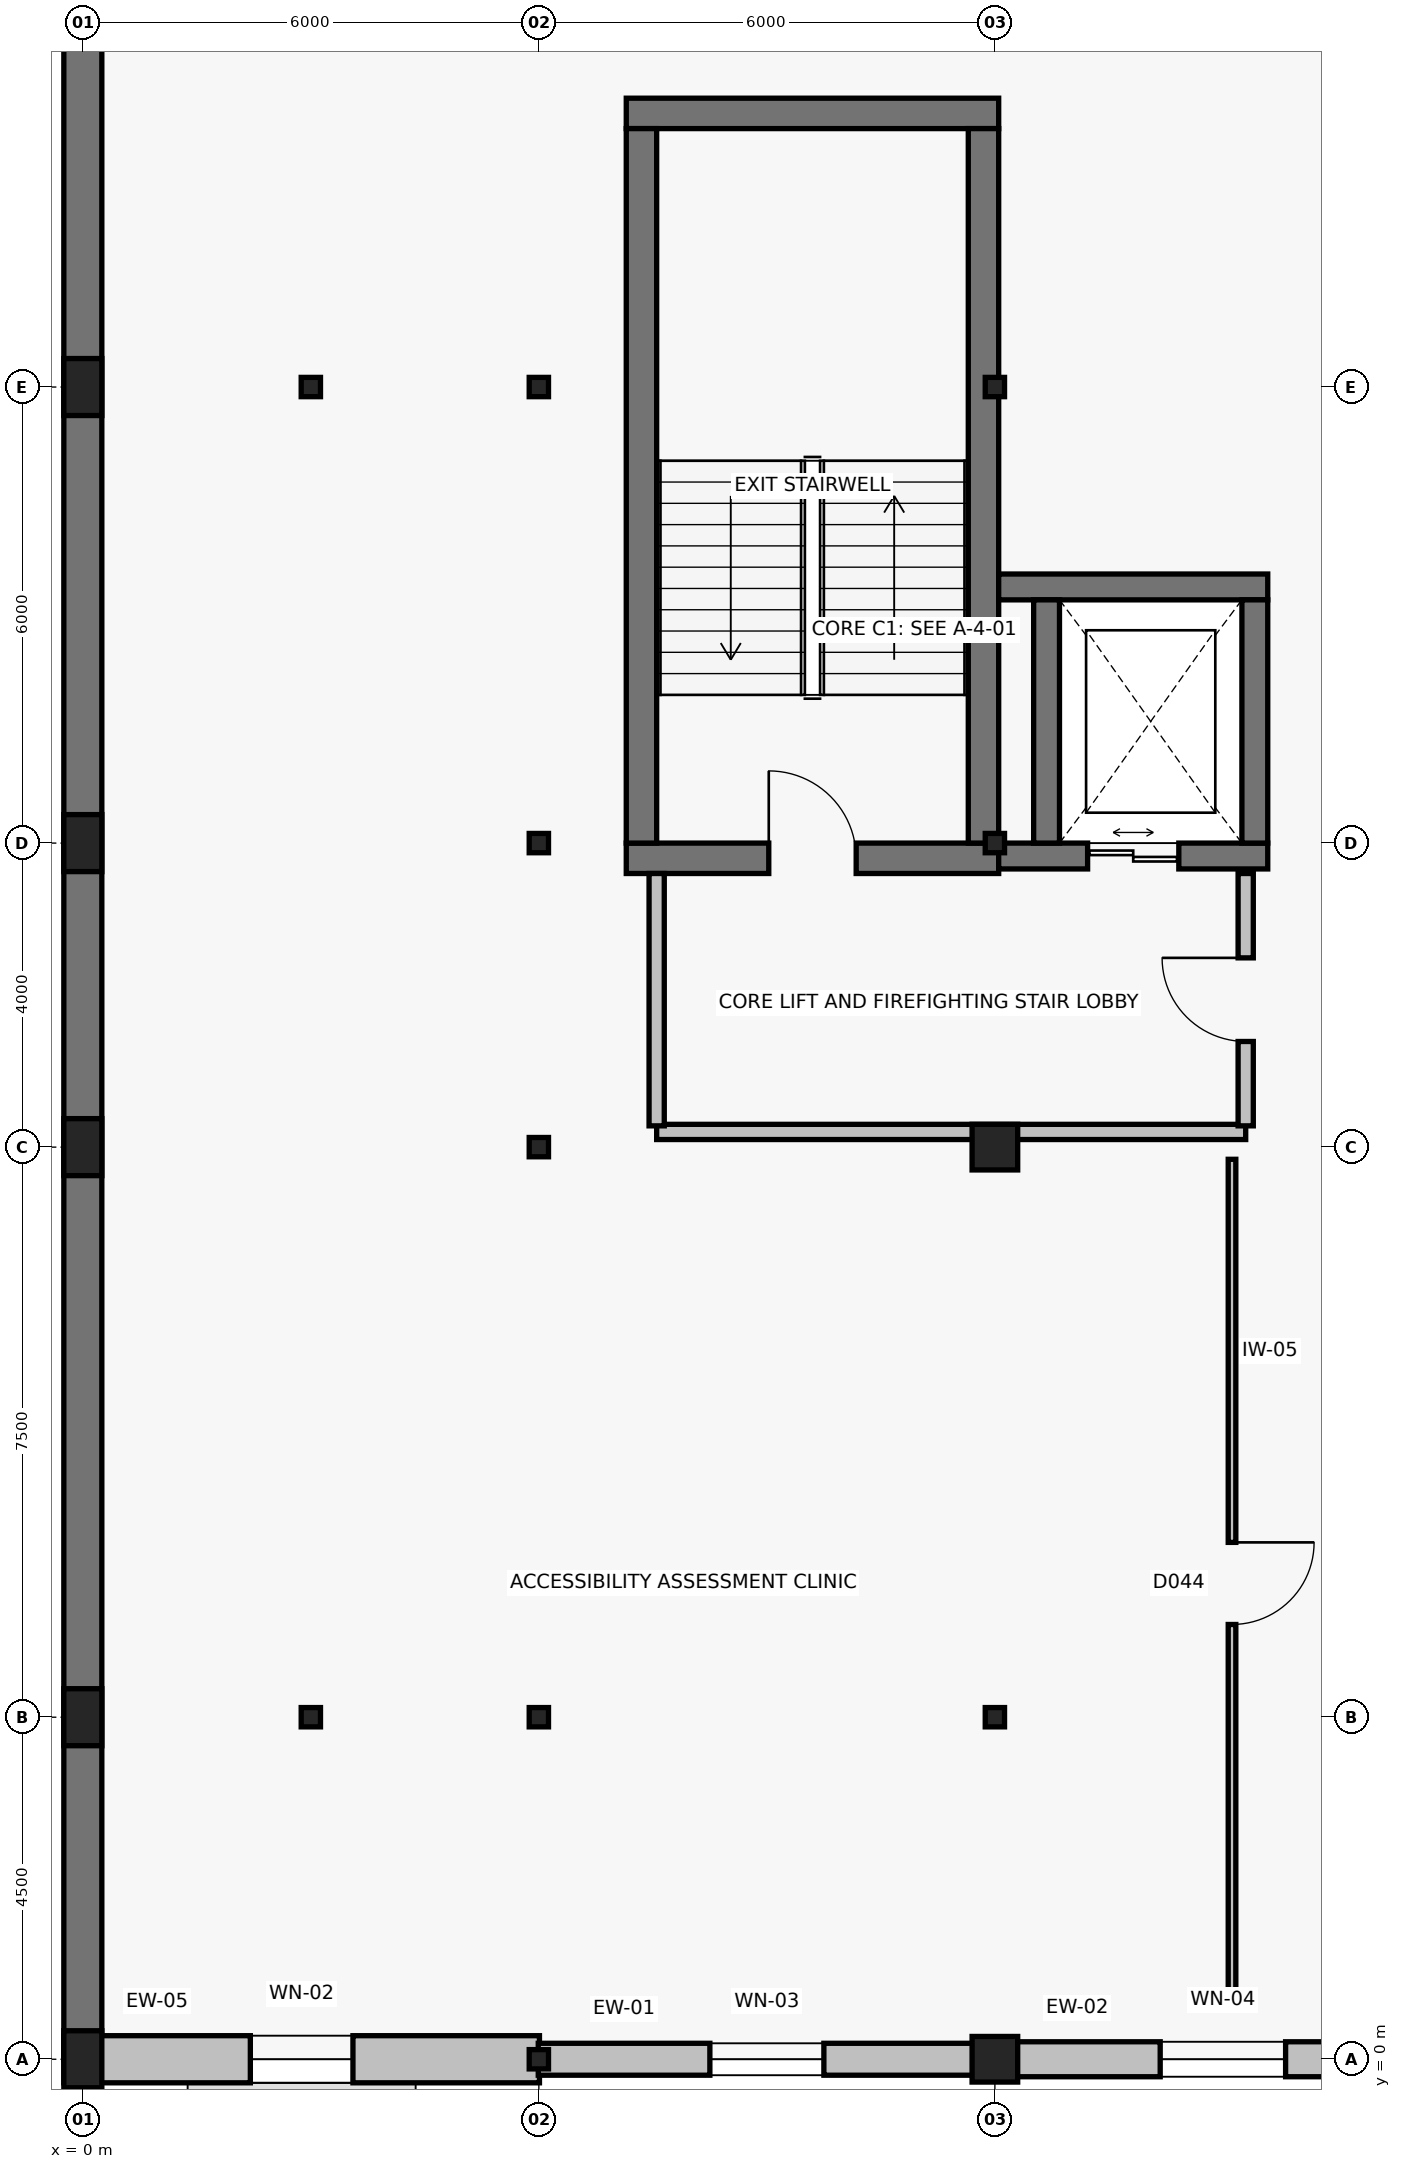
"""IFC4 building model, lengths in metres.
Left out: names, types, materials, properties, quantities, classifications, styles, units other than length and angle.
Written with IfcOpenShell. Run it as: python <this file> out.ifc"""

import sys

from ifc_helpers import new_model, si_unit, direction, frame, frame_2d, origin, origin_2d, place, context, subcontext, project, spatial, rectangle, hollow_rectangle, extrude, element, fill, save


model = new_model("IFC4")
c1 = context("Model", 3, precision=1e-05, world=origin(), true_north=direction((0.0, 1.0)))
c2 = subcontext(c1, "Body", "Model", "MODEL_VIEW")
j1 = project(units=[si_unit("LENGTHUNIT", "METRE"), si_unit("PLANEANGLEUNIT", "RADIAN")], contexts=[c1])
p1 = place(None, origin())
s1 = spatial("IfcSite", under=j1, at=p1, CompositionType="ELEMENT")
p2 = place(p1, origin())
s2 = spatial("IfcBuilding", under=s1, at=p2, CompositionType="ELEMENT")
p3 = place(p2, frame((0.0, 0.0, 11.4)))
s3 = spatial("IfcBuildingStorey", under=s2, at=p3, CompositionType="ELEMENT", Elevation=11.4)
for number, where, z_axis, x_axis in (
    (1, (0.0, 0.0, 0.0), (0.0, 0.0, 1.0), (1.0, 0.0, 0.0)),
    (2, (0.0, 4.5, 0.0), (0.0, 0.0, 1.0), (1.0, 0.0, 0.0)),
    (3, (0.0, 12.0, 0.0), (0.0, 0.0, 1.0), (1.0, 0.0, 0.0)),
    (4, (0.0, 16.0, 0.0), (0.0, 0.0, 1.0), (1.0, 0.0, 0.0)),
    (5, (0.0, 22.0, 0.0), (0.0, 0.0, 1.0), (1.0, 0.0, 0.0)),
):
    element("IfcColumn", number, at=place(p3, frame(where, z_axis=z_axis, x_axis=x_axis)), inside=s3, PredefinedType="PILASTER", context=c2, shape_type="SweptSolid", body=[
        extrude(rectangle(XDim=0.5, YDim=0.75, at=origin_2d()), origin(), (0.0, 0.0, 1.0), 4.0),
    ])
for number, where, z_axis, x_axis in (
    (6, (3.0, 4.5, 0.0), (0.0, 0.0, 1.0), (1.0, 0.0, 0.0)),
    (7, (3.0, 22.0, 0.0), (0.0, 0.0, 1.0), (1.0, 0.0, 0.0)),
    (8, (6.0, 0.0, 0.0), (0.0, 0.0, 1.0), (1.0, 0.0, 0.0)),
    (9, (6.0, 4.5, 0.0), (0.0, 0.0, 1.0), (1.0, 0.0, 0.0)),
    (10, (6.0, 12.0, 0.0), (0.0, 0.0, 1.0), (1.0, 0.0, 0.0)),
    (11, (6.0, 16.0, 0.0), (0.0, 0.0, 1.0), (1.0, 0.0, 0.0)),
    (12, (6.0, 22.0, 0.0), (0.0, 0.0, 1.0), (1.0, 0.0, 0.0)),
):
    element("IfcColumn", number, at=place(p3, frame(where, z_axis=z_axis, x_axis=x_axis)), inside=s3, PredefinedType="COLUMN", context=c2, shape_type="SweptSolid", body=[
        extrude(hollow_rectangle(XDim=0.254, YDim=0.254, WallThickness=0.01, InnerFilletRadius=0.01, OuterFilletRadius=0.019, at=origin_2d()), origin(), (0.0, 0.0, 1.0), 4.0),
    ])
p4 = place(p3, frame((12.0, 0.0, 0.0), z_axis=(0.0, 0.0, 1.0), x_axis=(1.0, 0.0, 0.0)))
e13 = element("IfcColumn", 13, at=p4, inside=s3, PredefinedType="COLUMN", context=c2, shape_type="SweptSolid", body=[
    extrude(rectangle(XDim=0.6, YDim=0.6, at=origin_2d()), origin(), (0.0, 0.0, 1.0), 4.0),
])
p5 = place(p3, frame((12.0, 4.5, 0.0), z_axis=(0.0, 0.0, 1.0), x_axis=(1.0, 0.0, 0.0)))
e14 = element("IfcColumn", 14, at=p5, inside=s3, PredefinedType="COLUMN", context=c2, shape_type="SweptSolid", body=[
    extrude(hollow_rectangle(XDim=0.254, YDim=0.254, WallThickness=0.01, InnerFilletRadius=0.01, OuterFilletRadius=0.019, at=origin_2d()), origin(), (0.0, 0.0, 1.0), 4.0),
])
p6 = place(p3, frame((12.0, 12.0, 0.0), z_axis=(0.0, 0.0, 1.0), x_axis=(1.0, 0.0, 0.0)))
e15 = element("IfcColumn", 15, at=p6, inside=s3, PredefinedType="COLUMN", context=c2, shape_type="SweptSolid", body=[
    extrude(rectangle(XDim=0.6, YDim=0.6, at=origin_2d()), origin(), (0.0, 0.0, 1.0), 4.0),
])
for number, where, z_axis, x_axis in (
    (16, (12.0, 16.0, 0.0), (0.0, 0.0, 1.0), (1.0, 0.0, 0.0)),
    (17, (12.0, 22.0, 0.0), (0.0, 0.0, 1.0), (1.0, 0.0, 0.0)),
):
    element("IfcColumn", number, at=place(p3, frame(where, z_axis=z_axis, x_axis=x_axis)), inside=s3, PredefinedType="COLUMN", context=c2, shape_type="SweptSolid", body=[
        extrude(hollow_rectangle(XDim=0.254, YDim=0.254, WallThickness=0.01, InnerFilletRadius=0.01, OuterFilletRadius=0.019, at=origin_2d()), origin(), (0.0, 0.0, 1.0), 4.0),
    ])
p7 = place(p3, frame((0.0, -0.008, 0.0), z_axis=(0.0, 0.0, 1.0), x_axis=(0.0, 1.0, 0.0)))
e18 = element("IfcWall", 18, at=p7, inside=s3, PredefinedType="SOLIDWALL", context=c2, shape_type="SweptSolid", body=[
    extrude(rectangle(XDim=84.016, YDim=0.5, at=frame_2d((42.008, 0.0))), origin(), (0.0, 0.0, 1.0), 3.68),
])
p8 = place(p3, frame((-0.25, 0.0, 0.0), z_axis=(0.0, 0.0, 1.0), x_axis=(1.0, 0.0, 0.0)))
e19 = element("IfcWall", 19, at=p8, inside=s3, PredefinedType="SOLIDWALL", context=c2, shape_type="SweptSolid", body=[
    extrude(rectangle(XDim=6.258, YDim=0.62, at=frame_2d((3.129, 0.0))), origin(), (0.0, 0.0, 1.0), 3.111),
])
p9 = place(p8, frame((2.454, 0.0, 0.9)))
e20 = element("IfcOpeningElement", 20, at=p9, cuts=e19, PredefinedType="OPENING", context=c2, shape_type="SweptSolid", body=[
    extrude(rectangle(XDim=1.35, YDim=1.8, at=frame_2d((0.675, 0.9))), frame((0.0, 0.325, 0.0), z_axis=(0.0, -1.0, 0.0), x_axis=(1.0, 0.0, 0.0)), (0.0, 0.0, 1.0), 0.65),
])
p10 = place(p3, frame((5.992, 0.0, 0.0), z_axis=(0.0, 0.0, 1.0), x_axis=(1.0, 0.0, 0.0)))
e21 = element("IfcWall", 21, at=p10, inside=s3, PredefinedType="SOLIDWALL", context=c2, shape_type="SweptSolid", body=[
    extrude(rectangle(XDim=6.016, YDim=0.42, at=frame_2d((3.008, 0.0))), origin(), (0.0, 0.0, 1.0), 3.111),
])
p11 = place(p10, frame((2.258, 0.0, 0.9)))
e22 = element("IfcOpeningElement", 22, at=p11, cuts=e21, PredefinedType="OPENING", context=c2, shape_type="SweptSolid", body=[
    extrude(rectangle(XDim=1.5, YDim=1.8, at=frame_2d((0.75, 0.9))), frame((0.0, 0.225, 0.0), z_axis=(0.0, -1.0, 0.0), x_axis=(1.0, 0.0, 0.0)), (0.0, 0.0, 1.0), 0.45),
])
p12 = place(p3, frame((11.992, 0.0, 0.0), z_axis=(0.0, 0.0, 1.0), x_axis=(1.0, 0.0, 0.0)))
e23 = element("IfcWall", 23, at=p12, inside=s3, PredefinedType="SOLIDWALL", context=c2, shape_type="SweptSolid", body=[
    extrude(rectangle(XDim=6.016, YDim=0.46, at=frame_2d((3.008, 0.0))), origin(), (0.0, 0.0, 1.0), 3.187),
])
p13 = place(p12, frame((2.183, 0.0, 0.9)))
e24 = element("IfcOpeningElement", 24, at=p13, cuts=e23, PredefinedType="OPENING", context=c2, shape_type="SweptSolid", body=[
    extrude(rectangle(XDim=1.65, YDim=1.8, at=frame_2d((0.825, 0.9))), frame((0.0, 0.245, 0.0), z_axis=(0.0, -1.0, 0.0), x_axis=(1.0, 0.0, 0.0)), (0.0, 0.0, 1.0), 0.49),
])
p14 = place(p3, frame((7.15, 15.8, 0.0), z_axis=(0.0, 0.0, 1.0), x_axis=(1.0, 0.0, 0.0)))
e25 = element("IfcWall", 25, at=p14, inside=s3, PredefinedType="SHEAR", context=c2, shape_type="SweptSolid", body=[
    extrude(rectangle(XDim=4.9, YDim=0.4, at=frame_2d((2.45, 0.0))), origin(), (0.0, 0.0, 1.0), 3.76),
])
p15 = place(p14, frame((1.875, 0.0, 0.0)))
e26 = element("IfcOpeningElement", 26, at=p15, cuts=e25, PredefinedType="OPENING", context=c2, shape_type="SweptSolid", body=[
    extrude(rectangle(XDim=1.15, YDim=2.15, at=frame_2d((0.575, 1.075))), frame((0.0, 0.215, 0.0), z_axis=(0.0, -1.0, 0.0), x_axis=(1.0, 0.0, 0.0)), (0.0, 0.0, 1.0), 0.43),
])
p16 = place(p3, frame((12.05, 25.6, 0.0), z_axis=(0.0, 0.0, 1.0), x_axis=(-1.0, 0.0, 0.0)))
e27 = element("IfcWall", 27, at=p16, inside=s3, PredefinedType="SHEAR", context=c2, shape_type="SweptSolid", body=[
    extrude(rectangle(XDim=4.9, YDim=0.4, at=frame_2d((2.45, 0.0))), origin(), (0.0, 0.0, 1.0), 3.76),
])
for number, where, z_axis, x_axis in (
    (28, (7.35, 25.4, 0.0), (0.0, 0.0, 1.0), (0.0, -1.0, 0.0)),
    (29, (11.85, 16.0, 0.0), (0.0, 0.0, 1.0), (0.0, 1.0, 0.0)),
):
    element("IfcWall", number, at=place(p3, frame(where, z_axis=z_axis, x_axis=x_axis)), inside=s3, PredefinedType="SHEAR", context=c2, shape_type="SweptSolid", body=[
        extrude(rectangle(XDim=9.4, YDim=0.4, at=frame_2d((4.7, 0.0))), origin(), (0.0, 0.0, 1.0), 3.76),
    ])
p17 = place(p3, frame((12.05, 15.83, 0.0), z_axis=(0.0, 0.0, 1.0), x_axis=(1.0, 0.0, 0.0)))
e30 = element("IfcWall", 30, at=p17, inside=s3, PredefinedType="SHEAR", context=c2, shape_type="SweptSolid", body=[
    extrude(rectangle(XDim=3.54, YDim=0.34, at=frame_2d((1.77, 0.0))), origin(), (0.0, 0.0, 1.0), 3.76),
])
p18 = place(p17, frame((1.17, 0.0, 0.0)))
e31 = element("IfcOpeningElement", 31, at=p18, cuts=e30, PredefinedType="OPENING", context=c2, shape_type="SweptSolid", body=[
    extrude(rectangle(XDim=1.2, YDim=2.2, at=frame_2d((0.6, 1.1))), frame((0.0, 0.185, 0.0), z_axis=(0.0, -1.0, 0.0), x_axis=(1.0, 0.0, 0.0)), (0.0, 0.0, 1.0), 0.37),
])
p19 = place(p3, frame((15.59, 19.37, 0.0), z_axis=(0.0, 0.0, 1.0), x_axis=(-1.0, 0.0, 0.0)))
e32 = element("IfcWall", 32, at=p19, inside=s3, PredefinedType="SHEAR", context=c2, shape_type="SweptSolid", body=[
    extrude(rectangle(XDim=3.54, YDim=0.34, at=frame_2d((1.77, 0.0))), origin(), (0.0, 0.0, 1.0), 3.76),
])
for number, where, z_axis, x_axis in (
    (33, (12.68, 19.2, 0.0), (0.0, 0.0, 1.0), (0.0, -1.0, 0.0)),
    (34, (15.42, 16.0, 0.0), (0.0, 0.0, 1.0), (0.0, 1.0, 0.0)),
):
    element("IfcWall", number, at=place(p3, frame(where, z_axis=z_axis, x_axis=x_axis)), inside=s3, PredefinedType="SHEAR", context=c2, shape_type="SweptSolid", body=[
        extrude(rectangle(XDim=3.2, YDim=0.34, at=frame_2d((1.6, 0.0))), origin(), (0.0, 0.0, 1.0), 3.76),
    ])
p20 = place(p3, frame((7.55, 12.2, 0.0), z_axis=(0.0, 0.0, 1.0), x_axis=(1.0, 0.0, 0.0)))
e35 = element("IfcWall", 35, at=p20, inside=s3, PredefinedType="PARTITIONING", context=c2, shape_type="SweptSolid", body=[
    extrude(rectangle(XDim=7.75, YDim=0.2, at=frame_2d((3.875, 0.0))), origin(), (0.0, 0.0, 1.0), 3.187),
])
p21 = place(p3, frame((7.55, 15.6, 0.0), z_axis=(0.0, 0.0, 1.0), x_axis=(0.0, -1.0, 0.0)))
e36 = element("IfcWall", 36, at=p21, inside=s3, PredefinedType="PARTITIONING", context=c2, shape_type="SweptSolid", body=[
    extrude(rectangle(XDim=3.32, YDim=0.2, at=frame_2d((1.66, 0.0))), origin(), (0.0, 0.0, 1.0), 3.294),
])
p22 = place(p3, frame((15.3, 12.28, 0.0), z_axis=(0.0, 0.0, 1.0), x_axis=(0.0, 1.0, 0.0)))
e37 = element("IfcWall", 37, at=p22, inside=s3, PredefinedType="PARTITIONING", context=c2, shape_type="SweptSolid", body=[
    extrude(rectangle(XDim=3.32, YDim=0.2, at=frame_2d((1.66, 0.0))), origin(), (0.0, 0.0, 1.0), 3.296),
])
p23 = place(p22, frame((1.11, 0.0, 0.0)))
e38 = element("IfcOpeningElement", 38, at=p23, cuts=e37, PredefinedType="OPENING", context=c2, shape_type="SweptSolid", body=[
    extrude(rectangle(XDim=1.1, YDim=2.15, at=frame_2d((0.55, 1.075))), frame((0.0, 0.115, 0.0), z_axis=(0.0, -1.0, 0.0), x_axis=(1.0, 0.0, 0.0)), (0.0, 0.0, 1.0), 0.23),
])
p24 = place(p3, frame((15.12, 11.84, 0.0), z_axis=(0.0, 0.0, 1.0), x_axis=(0.0, -1.0, 0.0)))
e39 = element("IfcWall", 39, at=p24, inside=s3, PredefinedType="PARTITIONING", context=c2, shape_type="SweptSolid", body=[
    extrude(rectangle(XDim=11.16, YDim=0.1, at=frame_2d((5.58, 0.0))), origin(), (0.0, 0.0, 1.0), 3.187),
])
p25 = place(p24, frame((5.04, 0.0, 0.0)))
e40 = element("IfcOpeningElement", 40, at=p25, cuts=e39, PredefinedType="OPENING", context=c2, shape_type="SweptSolid", body=[
    extrude(rectangle(XDim=1.08, YDim=2.15, at=frame_2d((0.54, 1.075))), frame((0.0, 0.065, 0.0), z_axis=(0.0, -1.0, 0.0), x_axis=(1.0, 0.0, 0.0)), (0.0, 0.0, 1.0), 0.13),
])
p26 = place(p9, origin())
e41 = element("IfcWindow", 41, at=p26, inside=s3, PartitioningType="SINGLE_PANEL", PredefinedType="WINDOW", context=c2, shape_type="SweptSolid", body=[
    extrude(rectangle(XDim=1.35, YDim=1.8, at=frame_2d((0.675, 0.9))), frame((0.0, 0.03, 0.0), z_axis=(0.0, -1.0, 0.0), x_axis=(1.0, 0.0, 0.0)), (0.0, 0.0, 1.0), 0.06),
])
fill(e20, e41)
p27 = place(p11, origin())
e42 = element("IfcWindow", 42, at=p27, inside=s3, PartitioningType="SINGLE_PANEL", PredefinedType="WINDOW", context=c2, shape_type="SweptSolid", body=[
    extrude(rectangle(XDim=1.5, YDim=1.8, at=frame_2d((0.75, 0.9))), frame((0.0, 0.03, 0.0), z_axis=(0.0, -1.0, 0.0), x_axis=(1.0, 0.0, 0.0)), (0.0, 0.0, 1.0), 0.06),
])
fill(e22, e42)
p28 = place(p13, origin())
e43 = element("IfcWindow", 43, at=p28, inside=s3, PartitioningType="SINGLE_PANEL", PredefinedType="WINDOW", context=c2, shape_type="SweptSolid", body=[
    extrude(rectangle(XDim=1.65, YDim=1.8, at=frame_2d((0.825, 0.9))), frame((0.0, 0.03, 0.0), z_axis=(0.0, -1.0, 0.0), x_axis=(1.0, 0.0, 0.0)), (0.0, 0.0, 1.0), 0.06),
])
fill(e24, e43)
p29 = place(p15, origin())
e44 = element("IfcDoor", 44, at=p29, inside=s3, OperationType="SINGLE_SWING_LEFT", PredefinedType="DOOR", context=c2, shape_type="SweptSolid", body=[
    extrude(rectangle(XDim=1.15, YDim=2.15, at=frame_2d((0.575, 1.075))), frame((0.0, 0.025, 0.0), z_axis=(0.0, -1.0, 0.0), x_axis=(1.0, 0.0, 0.0)), (0.0, 0.0, 1.0), 0.05),
])
fill(e26, e44)
p30 = place(p18, origin())
e45 = element("IfcDoor", 45, at=p30, inside=s3, OperationType="DOUBLE_DOOR_SLIDING", PredefinedType="DOOR", context=c2, shape_type="SweptSolid", body=[
    extrude(rectangle(XDim=1.2, YDim=2.2, at=frame_2d((0.6, 1.1))), frame((0.0, 0.025, 0.0), z_axis=(0.0, -1.0, 0.0), x_axis=(1.0, 0.0, 0.0)), (0.0, 0.0, 1.0), 0.05),
])
fill(e31, e45)
p31 = place(p23, origin())
e46 = element("IfcDoor", 46, at=p31, inside=s3, OperationType="SINGLE_SWING_RIGHT", PredefinedType="DOOR", context=c2, shape_type="SweptSolid", body=[
    extrude(rectangle(XDim=1.1, YDim=2.15, at=frame_2d((0.55, 1.075))), frame((0.0, 0.025, 0.0), z_axis=(0.0, -1.0, 0.0), x_axis=(1.0, 0.0, 0.0)), (0.0, 0.0, 1.0), 0.05),
])
fill(e38, e46)
p32 = place(p25, origin())
e47 = element("IfcDoor", 47, at=p32, inside=s3, OperationType="SINGLE_SWING_LEFT", PredefinedType="DOOR", context=c2, shape_type="SweptSolid", body=[
    extrude(rectangle(XDim=1.08, YDim=2.15, at=frame_2d((0.54, 1.075))), frame((0.0, 0.025, 0.0), z_axis=(0.0, -1.0, 0.0), x_axis=(1.0, 0.0, 0.0)), (0.0, 0.0, 1.0), 0.05),
])
fill(e40, e47)
save(model, sys.argv[1])
